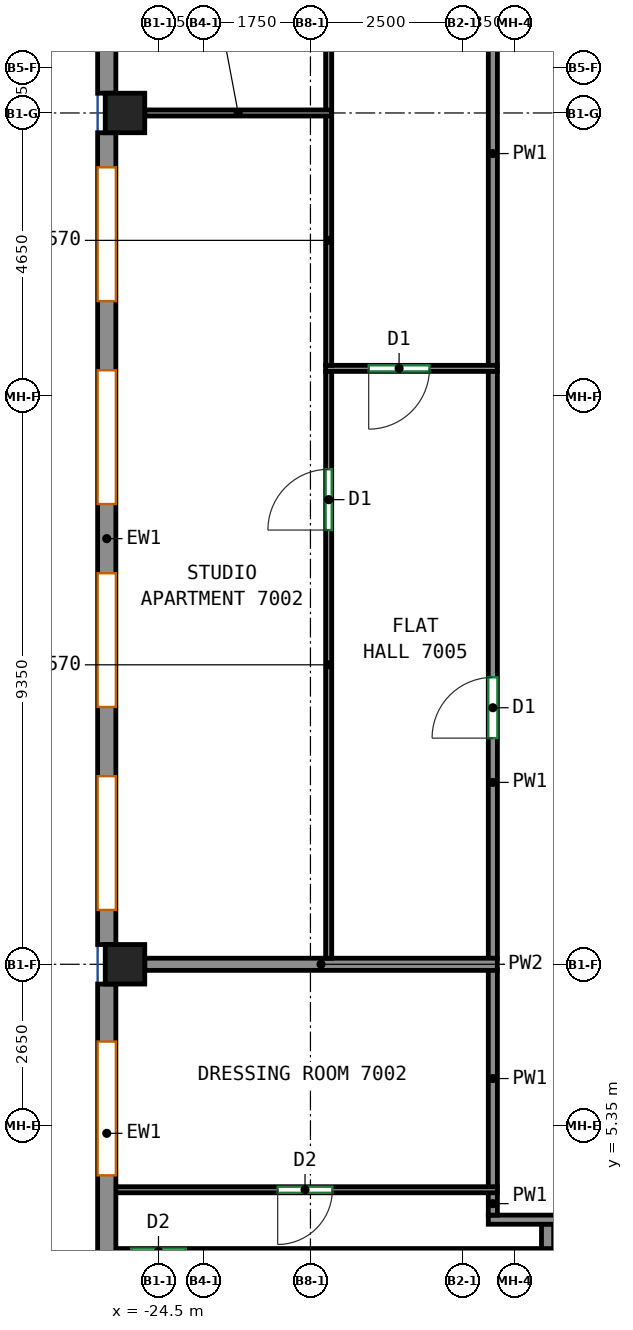
"""IFC4 building model, lengths in metres.
Left out: names, types, materials, properties, quantities, classifications, styles, units other than length and angle.
Written with IfcOpenShell. Run it as: python <this file> out.ifc"""

import sys

from ifc_helpers import new_model, si_unit, direction, frame, frame_2d, origin, origin_2d, place, context, subcontext, project, spatial, rectangle, extrude, source, transform, mapped, element, fill, save


model = new_model("IFC4")
c1 = context("Model", 3, precision=1e-05, world=origin(), true_north=direction((0.0, 1.0)))
c2 = subcontext(c1, "Body", "Model", "MODEL_VIEW")
j1 = project(units=[si_unit("LENGTHUNIT", "METRE"), si_unit("PLANEANGLEUNIT", "RADIAN")], contexts=[c1])
p1 = place(None, origin())
s1 = spatial("IfcSite", under=j1, at=p1, CompositionType="ELEMENT")
p2 = place(p1, origin())
s2 = spatial("IfcBuilding", under=s1, at=p2, CompositionType="ELEMENT")
p3 = place(p2, frame((0.0, 0.0, 284.0)))
s3 = spatial("IfcBuildingStorey", under=s2, at=p3, CompositionType="ELEMENT", Elevation=284.0)
m1 = source(origin(), c2, "Body", "SweptSolid", [
    extrude(rectangle(XDim=0.65, YDim=0.65, at=origin_2d()), origin(), (0.0, 0.0, 1.0), 3.12),
])
for number, where, z_axis, x_axis in (
    (1, (-25.05, 8.0, 0.0), (0.0, 0.0, 1.0), (1.0, 0.0, 0.0)),
    (2, (-25.05, 22.0, 0.0), (0.0, 0.0, 1.0), (1.0, 0.0, 0.0)),
):
    element("IfcColumn", number, at=place(p3, frame(where, z_axis=z_axis, x_axis=x_axis)), inside=s3, PredefinedType="COLUMN", context=c2, shape_type="MappedRepresentation", body=[
        mapped(m1, transform((0.0, 0.0, 0.0))),
    ])
m2 = source(origin(), c2, "Body", "SweptSolid", [
    extrude(rectangle(XDim=4.032, YDim=0.3, at=frame_2d((2.016, 0.0))), origin(), (0.0, 0.0, 1.0), 3.12),
])
p4 = place(p3, frame((-25.35, 26.357, 0.0), z_axis=(0.0, 0.0, 1.0), x_axis=(0.0, -1.0, 0.0)))
e3 = element("IfcWall", 3, at=p4, inside=s3, PredefinedType="SOLIDWALL", context=c2, shape_type="MappedRepresentation", body=[
    mapped(m2, transform((0.0, 0.0, 0.0))),
])
p5 = place(p4, frame((0.916, 0.0, 0.8)))
e4 = element("IfcOpeningElement", 4, at=p5, cuts=e3, PredefinedType="OPENING", context=c2, shape_type="SweptSolid", body=[
    extrude(rectangle(XDim=2.2, YDim=2.05, at=frame_2d((1.1, 1.025))), frame((0.0, 0.16, 0.0), z_axis=(0.0, -1.0, 0.0), x_axis=(1.0, 0.0, 0.0)), (0.0, 0.0, 1.0), 0.32),
])
m3 = source(origin(), c2, "Body", "SweptSolid", [
    extrude(rectangle(XDim=13.35, YDim=0.3, at=frame_2d((6.675, 0.0))), origin(), (0.0, 0.0, 1.0), 3.12),
])
p6 = place(p3, frame((-25.35, 21.675, 0.0), z_axis=(0.0, 0.0, 1.0), x_axis=(0.0, -1.0, 0.0)))
e5 = element("IfcWall", 5, at=p6, inside=s3, PredefinedType="SOLIDWALL", context=c2, shape_type="MappedRepresentation", body=[
    mapped(m3, transform((0.0, 0.0, 0.0))),
])
p7 = place(p6, frame((0.569, 0.0, 0.8)))
e6 = element("IfcOpeningElement", 6, at=p7, cuts=e5, PredefinedType="OPENING", context=c2, shape_type="SweptSolid", body=[
    extrude(rectangle(XDim=2.2, YDim=2.05, at=frame_2d((1.1, 1.025))), frame((0.0, 0.16, 0.0), z_axis=(0.0, -1.0, 0.0), x_axis=(1.0, 0.0, 0.0)), (0.0, 0.0, 1.0), 0.32),
])
p8 = place(p6, frame((3.906, 0.0, 0.8)))
e7 = element("IfcOpeningElement", 7, at=p8, cuts=e5, PredefinedType="OPENING", context=c2, shape_type="SweptSolid", body=[
    extrude(rectangle(XDim=2.2, YDim=2.05, at=frame_2d((1.1, 1.025))), frame((0.0, 0.16, 0.0), z_axis=(0.0, -1.0, 0.0), x_axis=(1.0, 0.0, 0.0)), (0.0, 0.0, 1.0), 0.32),
])
p9 = place(p6, frame((7.244, 0.0, 0.8)))
e8 = element("IfcOpeningElement", 8, at=p9, cuts=e5, PredefinedType="OPENING", context=c2, shape_type="SweptSolid", body=[
    extrude(rectangle(XDim=2.2, YDim=2.05, at=frame_2d((1.1, 1.025))), frame((0.0, 0.16, 0.0), z_axis=(0.0, -1.0, 0.0), x_axis=(1.0, 0.0, 0.0)), (0.0, 0.0, 1.0), 0.32),
])
p10 = place(p6, frame((10.581, 0.0, 0.8)))
e9 = element("IfcOpeningElement", 9, at=p10, cuts=e5, PredefinedType="OPENING", context=c2, shape_type="SweptSolid", body=[
    extrude(rectangle(XDim=2.2, YDim=2.05, at=frame_2d((1.1, 1.025))), frame((0.0, 0.16, 0.0), z_axis=(0.0, -1.0, 0.0), x_axis=(1.0, 0.0, 0.0)), (0.0, 0.0, 1.0), 0.32),
])
m4 = source(origin(), c2, "Body", "SweptSolid", [
    extrude(rectangle(XDim=8.183, YDim=0.3, at=frame_2d((4.092, 0.0))), origin(), (0.0, 0.0, 1.0), 3.12),
])
p11 = place(p3, frame((-25.35, 7.675, 0.0), z_axis=(0.0, 0.0, 1.0), x_axis=(0.0, -1.0, 0.0)))
e10 = element("IfcWall", 10, at=p11, inside=s3, PredefinedType="SOLIDWALL", context=c2, shape_type="MappedRepresentation", body=[
    mapped(m4, transform((0.0, 0.0, 0.0))),
])
p12 = place(p11, frame((0.946, 0.0, 0.8)))
e11 = element("IfcOpeningElement", 11, at=p12, cuts=e10, PredefinedType="OPENING", context=c2, shape_type="SweptSolid", body=[
    extrude(rectangle(XDim=2.2, YDim=2.05, at=frame_2d((1.1, 1.025))), frame((0.0, 0.16, 0.0), z_axis=(0.0, -1.0, 0.0), x_axis=(1.0, 0.0, 0.0)), (0.0, 0.0, 1.0), 0.32),
])
p13 = place(p11, frame((5.037, 0.0, 0.8)))
e12 = element("IfcOpeningElement", 12, at=p13, cuts=e10, PredefinedType="OPENING", context=c2, shape_type="SweptSolid", body=[
    extrude(rectangle(XDim=2.2, YDim=2.05, at=frame_2d((1.1, 1.025))), frame((0.0, 0.16, 0.0), z_axis=(0.0, -1.0, 0.0), x_axis=(1.0, 0.0, 0.0)), (0.0, 0.0, 1.0), 0.32),
])
p14 = place(p3, frame((-19.075, 3.8, 0.0), z_axis=(0.0, 0.0, 1.0), x_axis=(1.0, 0.0, 0.0)))
e13 = element("IfcWall", 13, at=p14, inside=s3, PredefinedType="PARTITIONING", context=c2, shape_type="SweptSolid", body=[
    extrude(rectangle(XDim=4.89, YDim=0.15, at=frame_2d((2.445, 0.0))), origin(), (0.0, 0.0, 1.0), 3.12),
])
p15 = place(p3, frame((-19.0, 3.875, 0.0), z_axis=(0.0, 0.0, 1.0), x_axis=(0.0, 1.0, 0.0)))
e14 = element("IfcWall", 14, at=p15, inside=s3, PredefinedType="PARTITIONING", context=c2, shape_type="SweptSolid", body=[
    extrude(rectangle(XDim=0.377, YDim=0.15, at=frame_2d((0.188, 0.0))), origin(), (0.0, 0.0, 1.0), 3.12),
])
p16 = place(p3, frame((-19.0, 4.332, 0.0), z_axis=(0.0, 0.0, 1.0), x_axis=(0.0, 1.0, 0.0)))
e15 = element("IfcWall", 15, at=p16, inside=s3, PredefinedType="PARTITIONING", context=c2, shape_type="SweptSolid", body=[
    extrude(rectangle(XDim=3.578, YDim=0.15, at=frame_2d((1.789, 0.0))), origin(), (0.0, 0.0, 1.0), 3.12),
])
p17 = place(p3, frame((-19.0, 8.09, 0.0), z_axis=(0.0, 0.0, 1.0), x_axis=(0.0, 1.0, 0.0)))
e16 = element("IfcWall", 16, at=p17, inside=s3, PredefinedType="PARTITIONING", context=c2, shape_type="SweptSolid", body=[
    extrude(rectangle(XDim=9.67, YDim=0.15, at=frame_2d((4.835, 0.0))), origin(), (0.0, 0.0, 1.0), 3.12),
])
p18 = place(p17, frame((3.629, 0.0, 0.0)))
e17 = element("IfcOpeningElement", 17, at=p18, cuts=e16, PredefinedType="OPENING", context=c2, shape_type="SweptSolid", body=[
    extrude(rectangle(XDim=1.0, YDim=2.1, at=frame_2d((0.5, 1.05))), frame((0.0, 0.085, 0.0), z_axis=(0.0, -1.0, 0.0), x_axis=(1.0, 0.0, 0.0)), (0.0, 0.0, 1.0), 0.17),
])
p19 = place(p3, frame((-19.0, 17.84, 0.0), z_axis=(0.0, 0.0, 1.0), x_axis=(0.0, 1.0, 0.0)))
e18 = element("IfcWall", 18, at=p19, inside=s3, PredefinedType="PARTITIONING", context=c2, shape_type="SweptSolid", body=[
    extrude(rectangle(XDim=6.985, YDim=0.15, at=frame_2d((3.492, 0.0))), origin(), (0.0, 0.0, 1.0), 3.12),
])
p20 = place(p3, frame((-18.0, 3.275, 0.0), z_axis=(0.0, 0.0, 1.0), x_axis=(-1.0, 0.0, 0.0)))
e19 = element("IfcWall", 19, at=p20, inside=s3, PredefinedType="PARTITIONING", context=c2, shape_type="SweptSolid", body=[
    extrude(rectangle(XDim=7.25, YDim=0.1, at=frame_2d((3.625, 0.0))), origin(), (0.0, 0.0, 1.0), 3.12),
])
p21 = place(p20, frame((6.049, 0.0, 0.0)))
e20 = element("IfcOpeningElement", 20, at=p21, cuts=e19, PredefinedType="OPENING", context=c2, shape_type="SweptSolid", body=[
    extrude(rectangle(XDim=0.9, YDim=2.1, at=frame_2d((0.45, 1.05))), frame((0.0, 0.06, 0.0), z_axis=(0.0, -1.0, 0.0), x_axis=(1.0, 0.0, 0.0)), (0.0, 0.0, 1.0), 0.12),
])
p22 = place(p3, frame((-18.927, 4.292, 0.0), z_axis=(0.0, 0.0, 1.0), x_axis=(-1.0, 0.0, 0.0)))
e21 = element("IfcWall", 21, at=p22, inside=s3, PredefinedType="PARTITIONING", context=c2, shape_type="SweptSolid", body=[
    extrude(rectangle(XDim=6.323, YDim=0.1, at=frame_2d((3.162, 0.0))), origin(), (0.0, 0.0, 1.0), 3.12),
])
p23 = place(p22, frame((2.712, 0.0, 0.0)))
e22 = element("IfcOpeningElement", 22, at=p23, cuts=e21, PredefinedType="OPENING", context=c2, shape_type="SweptSolid", body=[
    extrude(rectangle(XDim=0.9, YDim=2.1, at=frame_2d((0.45, 1.05))), frame((0.0, 0.06, 0.0), z_axis=(0.0, -1.0, 0.0), x_axis=(1.0, 0.0, 0.0)), (0.0, 0.0, 1.0), 0.12),
])
p24 = place(p3, frame((-18.1, 3.325, 0.0), z_axis=(0.0, 0.0, 1.0), x_axis=(0.0, 1.0, 0.0)))
e23 = element("IfcWall", 23, at=p24, inside=s3, PredefinedType="PARTITIONING", context=c2, shape_type="SweptSolid", body=[
    extrude(rectangle(XDim=0.398, YDim=0.2, at=frame_2d((0.199, 0.0))), origin(), (0.0, 0.0, 1.0), 3.12),
])
p25 = place(p3, frame((-24.725, 8.0, 0.0), z_axis=(0.0, 0.0, 1.0), x_axis=(1.0, 0.0, 0.0)))
e24 = element("IfcWall", 24, at=p25, inside=s3, PredefinedType="PARTITIONING", context=c2, shape_type="SweptSolid", body=[
    extrude(rectangle(XDim=5.798, YDim=0.2, at=frame_2d((2.899, 0.0))), origin(), (0.0, 0.0, 1.0), 2.57),
])
p26 = place(p3, frame((-18.927, 17.8, 0.0), z_axis=(0.0, 0.0, 1.0), x_axis=(-1.0, 0.0, 0.0)))
e25 = element("IfcWall", 25, at=p26, inside=s3, PredefinedType="PARTITIONING", context=c2, shape_type="SweptSolid", body=[
    extrude(rectangle(XDim=2.823, YDim=0.1, at=frame_2d((1.412, 0.0))), origin(), (0.0, 0.0, 1.0), 3.12),
])
p27 = place(p26, frame((1.115, 0.0, 0.0)))
e26 = element("IfcOpeningElement", 26, at=p27, cuts=e25, PredefinedType="OPENING", context=c2, shape_type="SweptSolid", body=[
    extrude(rectangle(XDim=1.0, YDim=2.1, at=frame_2d((0.5, 1.05))), frame((0.0, 0.06, 0.0), z_axis=(0.0, -1.0, 0.0), x_axis=(1.0, 0.0, 0.0)), (0.0, 0.0, 1.0), 0.12),
])
p28 = place(p3, frame((-21.7, 8.1, 0.0), z_axis=(0.0, 0.0, 1.0), x_axis=(0.0, 1.0, 0.0)))
e27 = element("IfcWall", 27, at=p28, inside=s3, PredefinedType="PARTITIONING", context=c2, shape_type="SweptSolid", body=[
    extrude(rectangle(XDim=9.65, YDim=0.1, at=frame_2d((4.825, 0.0))), origin(), (0.0, 0.0, 1.0), 2.57),
])
p29 = place(p28, frame((7.041, 0.0, 0.0)))
e28 = element("IfcOpeningElement", 28, at=p29, cuts=e27, PredefinedType="OPENING", context=c2, shape_type="SweptSolid", body=[
    extrude(rectangle(XDim=1.0, YDim=2.1, at=frame_2d((0.5, 1.05))), frame((0.0, 0.06, 0.0), z_axis=(0.0, -1.0, 0.0), x_axis=(1.0, 0.0, 0.0)), (0.0, 0.0, 1.0), 0.12),
])
p30 = place(p3, frame((-21.7, 17.85, 0.0), z_axis=(0.0, 0.0, 1.0), x_axis=(0.0, 1.0, 0.0)))
e29 = element("IfcWall", 29, at=p30, inside=s3, PredefinedType="PARTITIONING", context=c2, shape_type="SweptSolid", body=[
    extrude(rectangle(XDim=4.11, YDim=0.1, at=frame_2d((2.055, 0.0))), origin(), (0.0, 0.0, 1.0), 2.57),
])
p31 = place(p3, frame((-21.7, 22.04, 0.0), z_axis=(0.0, 0.0, 1.0), x_axis=(0.0, 1.0, 0.0)))
e30 = element("IfcWall", 30, at=p31, inside=s3, PredefinedType="PARTITIONING", context=c2, shape_type="SweptSolid", body=[
    extrude(rectangle(XDim=5.51, YDim=0.1, at=frame_2d((2.755, 0.0))), origin(), (0.0, 0.0, 1.0), 2.57),
])
p32 = place(p31, frame((3.809, 0.0, 0.0)))
e31 = element("IfcOpeningElement", 31, at=p32, cuts=e30, PredefinedType="OPENING", context=c2, shape_type="SweptSolid", body=[
    extrude(rectangle(XDim=0.9, YDim=2.1, at=frame_2d((0.45, 1.05))), frame((0.0, 0.06, 0.0), z_axis=(0.0, -1.0, 0.0), x_axis=(1.0, 0.0, 0.0)), (0.0, 0.0, 1.0), 0.12),
])
p33 = place(p3, frame((-21.652, 22.0, 0.0), z_axis=(0.0, 0.0, 1.0), x_axis=(-1.0, 0.0, 0.0)))
e32 = element("IfcWall", 32, at=p33, inside=s3, PredefinedType="PARTITIONING", context=c2, shape_type="SweptSolid", body=[
    extrude(rectangle(XDim=3.073, YDim=0.1, at=frame_2d((1.537, 0.0))), origin(), (0.0, 0.0, 1.0), 2.57),
])
p34 = place(p7, origin())
e33 = element("IfcWindow", 33, at=p34, inside=s3, PartitioningType="SINGLE_PANEL", PredefinedType="WINDOW", context=c2, shape_type="SweptSolid", body=[
    extrude(rectangle(XDim=2.2, YDim=2.05, at=frame_2d((1.1, 1.025))), frame((0.0, 0.03, 0.0), z_axis=(0.0, -1.0, 0.0), x_axis=(1.0, 0.0, 0.0)), (0.0, 0.0, 1.0), 0.06),
])
fill(e6, e33)
p35 = place(p8, origin())
e34 = element("IfcWindow", 34, at=p35, inside=s3, PartitioningType="SINGLE_PANEL", PredefinedType="WINDOW", context=c2, shape_type="SweptSolid", body=[
    extrude(rectangle(XDim=2.2, YDim=2.05, at=frame_2d((1.1, 1.025))), frame((0.0, 0.03, 0.0), z_axis=(0.0, -1.0, 0.0), x_axis=(1.0, 0.0, 0.0)), (0.0, 0.0, 1.0), 0.06),
])
fill(e7, e34)
p36 = place(p9, origin())
e35 = element("IfcWindow", 35, at=p36, inside=s3, PartitioningType="SINGLE_PANEL", PredefinedType="WINDOW", context=c2, shape_type="SweptSolid", body=[
    extrude(rectangle(XDim=2.2, YDim=2.05, at=frame_2d((1.1, 1.025))), frame((0.0, 0.03, 0.0), z_axis=(0.0, -1.0, 0.0), x_axis=(1.0, 0.0, 0.0)), (0.0, 0.0, 1.0), 0.06),
])
fill(e8, e35)
p37 = place(p10, origin())
e36 = element("IfcWindow", 36, at=p37, inside=s3, PartitioningType="SINGLE_PANEL", PredefinedType="WINDOW", context=c2, shape_type="SweptSolid", body=[
    extrude(rectangle(XDim=2.2, YDim=2.05, at=frame_2d((1.1, 1.025))), frame((0.0, 0.03, 0.0), z_axis=(0.0, -1.0, 0.0), x_axis=(1.0, 0.0, 0.0)), (0.0, 0.0, 1.0), 0.06),
])
fill(e9, e36)
p38 = place(p12, origin())
e37 = element("IfcWindow", 37, at=p38, inside=s3, PartitioningType="SINGLE_PANEL", PredefinedType="WINDOW", context=c2, shape_type="SweptSolid", body=[
    extrude(rectangle(XDim=2.2, YDim=2.05, at=frame_2d((1.1, 1.025))), frame((0.0, 0.03, 0.0), z_axis=(0.0, -1.0, 0.0), x_axis=(1.0, 0.0, 0.0)), (0.0, 0.0, 1.0), 0.06),
])
fill(e11, e37)
p39 = place(p21, origin())
e38 = element("IfcDoor", 38, at=p39, inside=s3, OperationType="SINGLE_SWING_LEFT", PredefinedType="DOOR", context=c2, shape_type="SweptSolid", body=[
    extrude(rectangle(XDim=0.9, YDim=2.1, at=frame_2d((0.45, 1.05))), frame((0.0, 0.025, 0.0), z_axis=(0.0, -1.0, 0.0), x_axis=(1.0, 0.0, 0.0)), (0.0, 0.0, 1.0), 0.05),
])
fill(e20, e38)
p40 = place(p23, origin())
e39 = element("IfcDoor", 39, at=p40, inside=s3, OperationType="SINGLE_SWING_RIGHT", PredefinedType="DOOR", context=c2, shape_type="SweptSolid", body=[
    extrude(rectangle(XDim=0.9, YDim=2.1, at=frame_2d((0.45, 1.05))), frame((0.0, 0.025, 0.0), z_axis=(0.0, -1.0, 0.0), x_axis=(1.0, 0.0, 0.0)), (0.0, 0.0, 1.0), 0.05),
])
fill(e22, e39)
p41 = place(p18, origin())
e40 = element("IfcDoor", 40, at=p41, inside=s3, OperationType="SINGLE_SWING_LEFT", PredefinedType="DOOR", context=c2, shape_type="SweptSolid", body=[
    extrude(rectangle(XDim=1.0, YDim=2.1, at=frame_2d((0.5, 1.05))), frame((0.0, 0.025, 0.0), z_axis=(0.0, -1.0, 0.0), x_axis=(1.0, 0.0, 0.0)), (0.0, 0.0, 1.0), 0.05),
])
fill(e17, e40)
p42 = place(p29, origin())
e41 = element("IfcDoor", 41, at=p42, inside=s3, OperationType="SINGLE_SWING_LEFT", PredefinedType="DOOR", context=c2, shape_type="SweptSolid", body=[
    extrude(rectangle(XDim=1.0, YDim=2.1, at=frame_2d((0.5, 1.05))), frame((0.0, 0.025, 0.0), z_axis=(0.0, -1.0, 0.0), x_axis=(1.0, 0.0, 0.0)), (0.0, 0.0, 1.0), 0.05),
])
fill(e28, e41)
p43 = place(p27, origin())
e42 = element("IfcDoor", 42, at=p43, inside=s3, OperationType="SINGLE_SWING_RIGHT", PredefinedType="DOOR", context=c2, shape_type="SweptSolid", body=[
    extrude(rectangle(XDim=1.0, YDim=2.1, at=frame_2d((0.5, 1.05))), frame((0.0, 0.025, 0.0), z_axis=(0.0, -1.0, 0.0), x_axis=(1.0, 0.0, 0.0)), (0.0, 0.0, 1.0), 0.05),
])
fill(e26, e42)
save(model, sys.argv[1])
